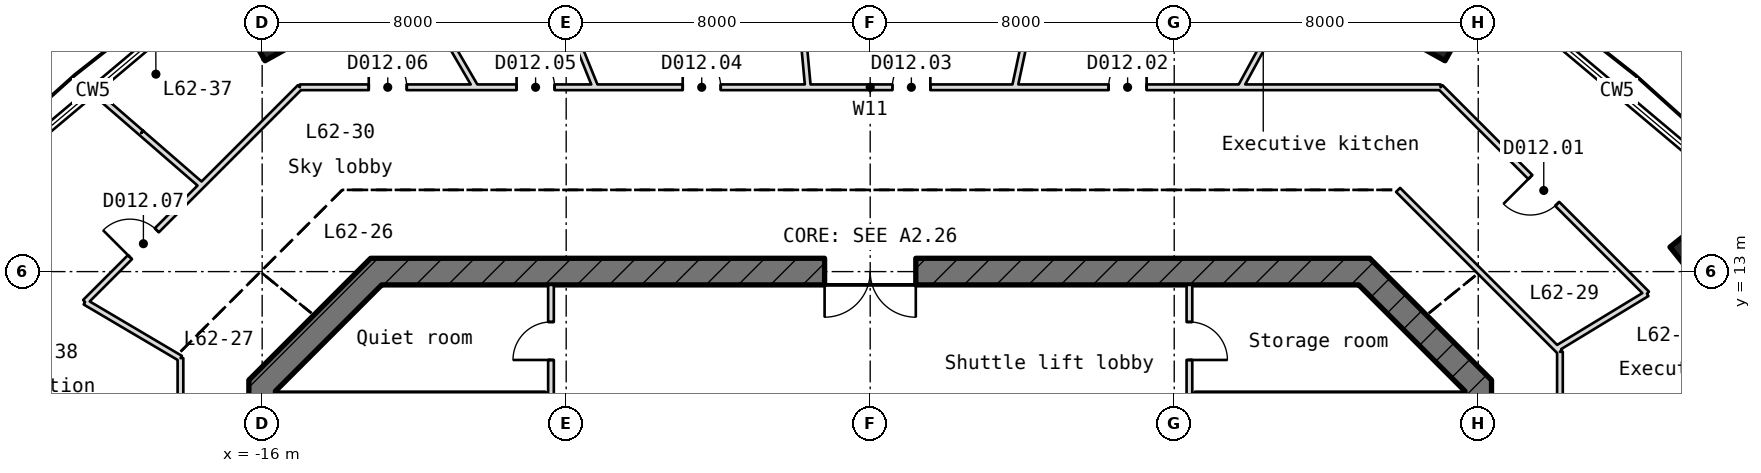
"""IFC4 building model, lengths in metres.
Left out: names, types, materials, properties, quantities, classifications, styles, units other than length and angle.
Written with IfcOpenShell. Run it as: python <this file> out.ifc"""

import sys

from ifc_helpers import new_model, si_unit, direction, frame, frame_2d, origin, origin_2d, place, context, subcontext, project, spatial, rectangle, hollow_rectangle, extrude, element, fill, save


model = new_model("IFC4")
c1 = context("Model", 3, precision=1e-05, world=origin(), true_north=direction((0.0, 1.0)))
c2 = subcontext(c1, "Body", "Model", "MODEL_VIEW")
j1 = project(units=[si_unit("LENGTHUNIT", "METRE"), si_unit("PLANEANGLEUNIT", "RADIAN")], contexts=[c1])
p1 = place(None, origin())
s1 = spatial("IfcSite", under=j1, at=p1, CompositionType="ELEMENT")
p2 = place(p1, origin())
s2 = spatial("IfcBuilding", under=s1, at=p2, CompositionType="ELEMENT")
p3 = place(p2, frame((0.0, 0.0, 279.1)))
s3 = spatial("IfcBuildingStorey", under=s2, at=p3, CompositionType="ELEMENT", Elevation=279.1)
for number, where, z_axis, x_axis in (
    (1, (22.331, 13.524, -0.25), (0.0, 0.0, 1.0), (0.627, -0.779, 0.0)),
    (2, (14.788, 19.793, -0.25), (0.0, 0.0, 1.0), (0.874, -0.486, 0.0)),
    (3, (-15.588, 19.793, -0.25), (0.0, 0.0, 1.0), (0.874, 0.486, 0.0)),
):
    element("IfcColumn", number, at=place(p3, frame(where, z_axis=z_axis, x_axis=x_axis)), inside=s3, PredefinedType="COLUMN", context=c2, shape_type="SweptSolid", body=[
        extrude(hollow_rectangle(XDim=1.8, YDim=1.85, WallThickness=0.06, at=origin_2d()), origin(), (0.0, 0.0, 1.0), 5.47),
    ])
p4 = place(p3, frame((16.0, -10.145, -0.25), z_axis=(0.0, 0.0, 1.0), x_axis=(0.0, 1.0, 0.0)))
e4 = element("IfcWall", 4, at=p4, inside=s3, PredefinedType="SHEAR", context=c2, shape_type="SweptSolid", body=[
    extrude(rectangle(XDim=20.29, YDim=0.7, at=frame_2d((10.145, 0.0))), origin(), (0.0, 0.0, 1.0), 5.47),
])
p5 = place(p4, frame((8.945, 0.0, 0.25)))
e5 = element("IfcOpeningElement", 5, at=p5, cuts=e4, PredefinedType="OPENING", context=c2, shape_type="SweptSolid", body=[
    extrude(rectangle(XDim=2.4, YDim=2.1, at=frame_2d((1.2, 1.05))), frame((0.0, 0.36, 0.0), z_axis=(0.0, -1.0, 0.0), x_axis=(1.0, 0.0, 0.0)), (0.0, 0.0, 1.0), 0.72),
])
p6 = place(p4, frame((13.545, 0.0, 0.25)))
e6 = element("IfcOpeningElement", 6, at=p6, cuts=e4, PredefinedType="OPENING", context=c2, shape_type="SweptSolid", body=[
    extrude(rectangle(XDim=1.2, YDim=2.1, at=frame_2d((0.6, 1.05))), frame((0.0, 0.36, 0.0), z_axis=(0.0, -1.0, 0.0), x_axis=(1.0, 0.0, 0.0)), (0.0, 0.0, 1.0), 0.72),
])
p7 = place(p4, frame((4.745, 0.0, 0.25)))
e7 = element("IfcOpeningElement", 7, at=p7, cuts=e4, PredefinedType="OPENING", context=c2, shape_type="SweptSolid", body=[
    extrude(rectangle(XDim=1.2, YDim=2.1, at=frame_2d((0.6, 1.05))), frame((0.0, 0.36, 0.0), z_axis=(0.0, -1.0, 0.0), x_axis=(1.0, 0.0, 0.0)), (0.0, 0.0, 1.0), 0.72),
])
p8 = place(p3, frame((16.103, 9.897, -0.25), z_axis=(0.0, 0.0, 1.0), x_axis=(-0.707106781187, 0.707106781187, 0.0)))
e8 = element("IfcWall", 8, at=p8, inside=s3, PredefinedType="SHEAR", context=c2, shape_type="SweptSolid", body=[
    extrude(rectangle(XDim=4.533, YDim=0.7, at=frame_2d((2.266, 0.0))), origin(), (0.0, 0.0, 1.0), 5.47),
])
p9 = place(p3, frame((13.145, 13.0, -0.25), z_axis=(0.0, 0.0, 1.0), x_axis=(-1.0, 0.0, 0.0)))
e9 = element("IfcWall", 9, at=p9, inside=s3, PredefinedType="SHEAR", context=c2, shape_type="SweptSolid", body=[
    extrude(rectangle(XDim=26.29, YDim=0.7, at=frame_2d((13.145, 0.0))), origin(), (0.0, 0.0, 1.0), 5.47),
])
p10 = place(p9, frame((11.945, 0.0, 0.25)))
e10 = element("IfcOpeningElement", 10, at=p10, cuts=e9, PredefinedType="OPENING", context=c2, shape_type="SweptSolid", body=[
    extrude(rectangle(XDim=2.4, YDim=2.1, at=frame_2d((1.2, 1.05))), frame((0.0, 0.36, 0.0), z_axis=(0.0, -1.0, 0.0), x_axis=(1.0, 0.0, 0.0)), (0.0, 0.0, 1.0), 0.72),
])
p11 = place(p3, frame((-12.897, 13.103, -0.25), z_axis=(0.0, 0.0, 1.0), x_axis=(-0.707106781187, -0.707106781187, 0.0)))
e11 = element("IfcWall", 11, at=p11, inside=s3, PredefinedType="SHEAR", context=c2, shape_type="SweptSolid", body=[
    extrude(rectangle(XDim=4.533, YDim=0.7, at=frame_2d((2.266, 0.0))), origin(), (0.0, 0.0, 1.0), 5.47),
])
p12 = place(p3, frame((-16.0, 10.145, -0.25), z_axis=(0.0, 0.0, 1.0), x_axis=(0.0, -1.0, 0.0)))
e12 = element("IfcWall", 12, at=p12, inside=s3, PredefinedType="SHEAR", context=c2, shape_type="SweptSolid", body=[
    extrude(rectangle(XDim=20.29, YDim=0.7, at=frame_2d((10.145, 0.0))), origin(), (0.0, 0.0, 1.0), 5.47),
])
p13 = place(p12, frame((8.945, 0.0, 0.25)))
e13 = element("IfcOpeningElement", 13, at=p13, cuts=e12, PredefinedType="OPENING", context=c2, shape_type="SweptSolid", body=[
    extrude(rectangle(XDim=2.4, YDim=2.1, at=frame_2d((1.2, 1.05))), frame((0.0, 0.36, 0.0), z_axis=(0.0, -1.0, 0.0), x_axis=(1.0, 0.0, 0.0)), (0.0, 0.0, 1.0), 0.72),
])
p14 = place(p12, frame((5.545, 0.0, 0.25)))
e14 = element("IfcOpeningElement", 14, at=p14, cuts=e12, PredefinedType="OPENING", context=c2, shape_type="SweptSolid", body=[
    extrude(rectangle(XDim=1.2, YDim=2.1, at=frame_2d((0.6, 1.05))), frame((0.0, 0.36, 0.0), z_axis=(0.0, -1.0, 0.0), x_axis=(1.0, 0.0, 0.0)), (0.0, 0.0, 1.0), 0.72),
])
for number, where, z_axis, x_axis in (
    (15, (-15.65, 9.7, -0.25), (0.0, 0.0, 1.0), (1.0, 0.0, 0.0)),
    (16, (8.55, 9.7, -0.25), (0.0, 0.0, 1.0), (1.0, 0.0, 0.0)),
):
    element("IfcWall", number, at=place(p3, frame(where, z_axis=z_axis, x_axis=x_axis)), inside=s3, PredefinedType="SHEAR", context=c2, shape_type="SweptSolid", body=[
        extrude(rectangle(XDim=7.1, YDim=0.25, at=frame_2d((3.55, 0.0))), origin(), (0.0, 0.0, 1.0), 5.47),
    ])
p15 = place(p3, frame((-8.4, 9.7, 0.0), z_axis=(0.0, 0.0, 1.0), x_axis=(0.0, 1.0, 0.0)))
e17 = element("IfcWall", 17, at=p15, inside=s3, PredefinedType="PARTITIONING", context=c2, shape_type="SweptSolid", body=[
    extrude(rectangle(XDim=2.95, YDim=0.15, at=frame_2d((1.475, 0.0))), origin(), (0.0, 0.0, 1.0), 5.22),
])
p16 = place(p15, frame((0.975, 0.0, 0.0)))
e18 = element("IfcOpeningElement", 18, at=p16, cuts=e17, PredefinedType="OPENING", context=c2, shape_type="SweptSolid", body=[
    extrude(rectangle(XDim=1.0, YDim=2.1, at=frame_2d((0.5, 1.05))), frame((0.0, 0.085, 0.0), z_axis=(0.0, -1.0, 0.0), x_axis=(1.0, 0.0, 0.0)), (0.0, 0.0, 1.0), 0.17),
])
p17 = place(p3, frame((8.4, 9.7, 0.0), z_axis=(0.0, 0.0, 1.0), x_axis=(0.0, 1.0, 0.0)))
e19 = element("IfcWall", 19, at=p17, inside=s3, PredefinedType="PARTITIONING", context=c2, shape_type="SweptSolid", body=[
    extrude(rectangle(XDim=2.95, YDim=0.15, at=frame_2d((1.475, 0.0))), origin(), (0.0, 0.0, 1.0), 5.22),
])
p18 = place(p17, frame((0.975, 0.0, 0.0)))
e20 = element("IfcOpeningElement", 20, at=p18, cuts=e19, PredefinedType="OPENING", context=c2, shape_type="SweptSolid", body=[
    extrude(rectangle(XDim=1.0, YDim=2.1, at=frame_2d((0.5, 1.05))), frame((0.0, 0.085, 0.0), z_axis=(0.0, -1.0, 0.0), x_axis=(1.0, 0.0, 0.0)), (0.0, 0.0, 1.0), 0.17),
])
p19 = place(p3, frame((-15.009, 17.85, 0.0), z_axis=(0.0, 0.0, 1.0), x_axis=(1.0, 0.0, 0.0)))
e21 = element("IfcWall", 21, at=p19, inside=s3, PredefinedType="PARTITIONING", context=c2, shape_type="SweptSolid", body=[
    extrude(rectangle(XDim=30.018, YDim=0.15, at=frame_2d((15.009, 0.0))), origin(), (0.0, 0.0, 1.0), 5.22),
])
p20 = place(p19, frame((21.282, 0.0, 0.0)))
e22 = element("IfcOpeningElement", 22, at=p20, cuts=e21, PredefinedType="OPENING", context=c2, shape_type="SweptSolid", body=[
    extrude(rectangle(XDim=1.0, YDim=2.1, at=frame_2d((0.5, 1.05))), frame((0.0, 0.085, 0.0), z_axis=(0.0, -1.0, 0.0), x_axis=(1.0, 0.0, 0.0)), (0.0, 0.0, 1.0), 0.17),
])
p21 = place(p19, frame((15.592, 0.0, 0.0)))
e23 = element("IfcOpeningElement", 23, at=p21, cuts=e21, PredefinedType="OPENING", context=c2, shape_type="SweptSolid", body=[
    extrude(rectangle(XDim=1.0, YDim=2.1, at=frame_2d((0.5, 1.05))), frame((0.0, 0.085, 0.0), z_axis=(0.0, -1.0, 0.0), x_axis=(1.0, 0.0, 0.0)), (0.0, 0.0, 1.0), 0.17),
])
p22 = place(p19, frame((10.075, 0.0, 0.0)))
e24 = element("IfcOpeningElement", 24, at=p22, cuts=e21, PredefinedType="OPENING", context=c2, shape_type="SweptSolid", body=[
    extrude(rectangle(XDim=1.0, YDim=2.1, at=frame_2d((0.5, 1.05))), frame((0.0, 0.085, 0.0), z_axis=(0.0, -1.0, 0.0), x_axis=(1.0, 0.0, 0.0)), (0.0, 0.0, 1.0), 0.17),
])
p23 = place(p19, frame((5.704, 0.0, 0.0)))
e25 = element("IfcOpeningElement", 25, at=p23, cuts=e21, PredefinedType="OPENING", context=c2, shape_type="SweptSolid", body=[
    extrude(rectangle(XDim=1.0, YDim=2.1, at=frame_2d((0.5, 1.05))), frame((0.0, 0.085, 0.0), z_axis=(0.0, -1.0, 0.0), x_axis=(1.0, 0.0, 0.0)), (0.0, 0.0, 1.0), 0.17),
])
p24 = place(p19, frame((1.814, 0.0, 0.0)))
e26 = element("IfcOpeningElement", 26, at=p24, cuts=e21, PredefinedType="OPENING", context=c2, shape_type="SweptSolid", body=[
    extrude(rectangle(XDim=1.0, YDim=2.1, at=frame_2d((0.5, 1.05))), frame((0.0, 0.085, 0.0), z_axis=(0.0, -1.0, 0.0), x_axis=(1.0, 0.0, 0.0)), (0.0, 0.0, 1.0), 0.17),
])
p25 = place(p3, frame((18.15, 7.049, 0.0), z_axis=(0.0, 0.0, 1.0), x_axis=(0.932169041373, 0.362023311828, 0.0)))
e27 = element("IfcWall", 27, at=p25, inside=s3, PredefinedType="PARTITIONING", context=c2, shape_type="SweptSolid", body=[
    extrude(rectangle(XDim=8.19, YDim=0.15, at=frame_2d((4.095, 0.0))), origin(), (0.0, 0.0, 1.0), 5.22),
])
p26 = place(p3, frame((18.064, 10.976, 0.0), z_axis=(0.0, 0.0, 1.0), x_axis=(0.854588442766, 0.519305876619, 0.0)))
e28 = element("IfcWall", 28, at=p26, inside=s3, PredefinedType="PARTITIONING", context=c2, shape_type="SweptSolid", body=[
    extrude(rectangle(XDim=2.779, YDim=0.15, at=frame_2d((1.39, 0.0))), origin(), (0.0, 0.0, 1.0), 4.867),
])
p27 = place(p3, frame((-20.659, 12.2, 0.0), z_axis=(0.0, 0.0, 1.0), x_axis=(0.707091504448, 0.707122057596, 0.0)))
e29 = element("IfcWall", 29, at=p27, inside=s3, PredefinedType="PARTITIONING", context=c2, shape_type="SweptSolid", body=[
    extrude(rectangle(XDim=7.991, YDim=0.15, at=frame_2d((3.995, 0.0))), origin(), (0.0, 0.0, 1.0), 5.22),
])
p28 = place(p27, frame((1.67, 0.0, 0.0)))
e30 = element("IfcOpeningElement", 30, at=p28, cuts=e29, PredefinedType="OPENING", context=c2, shape_type="SweptSolid", body=[
    extrude(rectangle(XDim=1.0, YDim=2.1, at=frame_2d((0.5, 1.05))), frame((0.0, 0.085, 0.0), z_axis=(0.0, -1.0, 0.0), x_axis=(1.0, 0.0, 0.0)), (0.0, 0.0, 1.0), 0.17),
])
p29 = place(p3, frame((9.742, 17.85, 0.0), z_axis=(0.0, 0.0, 1.0), x_axis=(0.479051311854, 0.877786899316, 0.0)))
e31 = element("IfcWall", 31, at=p29, inside=s3, PredefinedType="PARTITIONING", context=c2, shape_type="SweptSolid", body=[
    extrude(rectangle(XDim=3.435, YDim=0.15, at=frame_2d((1.717, 0.0))), origin(), (0.0, 0.0, 1.0), 4.803),
])
p30 = place(p3, frame((3.804, 17.85, 0.0), z_axis=(0.0, 0.0, 1.0), x_axis=(0.208471298824, 0.978028485049, 0.0)))
e32 = element("IfcWall", 32, at=p30, inside=s3, PredefinedType="PARTITIONING", context=c2, shape_type="SweptSolid", body=[
    extrude(rectangle(XDim=5.029, YDim=0.15, at=frame_2d((2.514, 0.0))), origin(), (0.0, 0.0, 1.0), 4.684),
])
p31 = place(p3, frame((18.15, -10.891, 0.0), z_axis=(0.0, 0.0, 1.0), x_axis=(0.0, 1.0, 0.0)))
e33 = element("IfcWall", 33, at=p31, inside=s3, PredefinedType="PARTITIONING", context=c2, shape_type="SweptSolid", body=[
    extrude(rectangle(XDim=21.781, YDim=0.15, at=frame_2d((10.891, 0.0))), origin(), (0.0, 0.0, 1.0), 5.22),
])
p32 = place(p31, frame((2.054, 0.0, 0.0)))
e34 = element("IfcOpeningElement", 34, at=p32, cuts=e33, PredefinedType="OPENING", context=c2, shape_type="SweptSolid", body=[
    extrude(rectangle(XDim=1.0, YDim=2.1, at=frame_2d((0.5, 1.05))), frame((0.0, 0.085, 0.0), z_axis=(0.0, -1.0, 0.0), x_axis=(1.0, 0.0, 0.0)), (0.0, 0.0, 1.0), 0.17),
])
p33 = place(p31, frame((7.791, 0.0, 0.0)))
e35 = element("IfcOpeningElement", 35, at=p33, cuts=e33, PredefinedType="OPENING", context=c2, shape_type="SweptSolid", body=[
    extrude(rectangle(XDim=1.0, YDim=2.1, at=frame_2d((0.5, 1.05))), frame((0.0, 0.085, 0.0), z_axis=(0.0, -1.0, 0.0), x_axis=(1.0, 0.0, 0.0)), (0.0, 0.0, 1.0), 0.17),
])
p34 = place(p31, frame((14.207, 0.0, 0.0)))
e36 = element("IfcOpeningElement", 36, at=p34, cuts=e33, PredefinedType="OPENING", context=c2, shape_type="SweptSolid", body=[
    extrude(rectangle(XDim=1.0, YDim=2.1, at=frame_2d((0.5, 1.05))), frame((0.0, 0.085, 0.0), z_axis=(0.0, -1.0, 0.0), x_axis=(1.0, 0.0, 0.0)), (0.0, 0.0, 1.0), 0.17),
])
p35 = place(p3, frame((-18.15, -10.891, 0.0), z_axis=(0.0, 0.0, 1.0), x_axis=(0.0, 1.0, 0.0)))
e37 = element("IfcWall", 37, at=p35, inside=s3, PredefinedType="PARTITIONING", context=c2, shape_type="SweptSolid", body=[
    extrude(rectangle(XDim=21.614, YDim=0.15, at=frame_2d((10.807, 0.0))), origin(), (0.0, 0.0, 1.0), 5.22),
])
p36 = place(p35, frame((14.093, 0.0, 0.0)))
e38 = element("IfcOpeningElement", 38, at=p36, cuts=e37, PredefinedType="OPENING", context=c2, shape_type="SweptSolid", body=[
    extrude(rectangle(XDim=1.0, YDim=2.1, at=frame_2d((0.5, 1.05))), frame((0.0, 0.085, 0.0), z_axis=(0.0, -1.0, 0.0), x_axis=(1.0, 0.0, 0.0)), (0.0, 0.0, 1.0), 0.17),
])
p37 = place(p35, frame((7.87, 0.0, 0.0)))
e39 = element("IfcOpeningElement", 39, at=p37, cuts=e37, PredefinedType="OPENING", context=c2, shape_type="SweptSolid", body=[
    extrude(rectangle(XDim=1.0, YDim=2.1, at=frame_2d((0.5, 1.05))), frame((0.0, 0.085, 0.0), z_axis=(0.0, -1.0, 0.0), x_axis=(1.0, 0.0, 0.0)), (0.0, 0.0, 1.0), 0.17),
])
p38 = place(p35, frame((2.92, 0.0, 0.0)))
e40 = element("IfcOpeningElement", 40, at=p38, cuts=e37, PredefinedType="OPENING", context=c2, shape_type="SweptSolid", body=[
    extrude(rectangle(XDim=1.0, YDim=2.1, at=frame_2d((0.5, 1.05))), frame((0.0, 0.085, 0.0), z_axis=(0.0, -1.0, 0.0), x_axis=(1.0, 0.0, 0.0)), (0.0, 0.0, 1.0), 0.17),
])
p39 = place(p3, frame((-1.638, 17.85, 0.0), z_axis=(0.0, 0.0, 1.0), x_axis=(-0.091426453393, 0.995811831432, 0.0)))
e41 = element("IfcWall", 41, at=p39, inside=s3, PredefinedType="PARTITIONING", context=c2, shape_type="SweptSolid", body=[
    extrude(rectangle(XDim=6.895, YDim=0.15, at=frame_2d((3.447, 0.0))), origin(), (0.0, 0.0, 1.0), 5.22),
])
p40 = place(p3, frame((-7.229, 17.85, 0.0), z_axis=(0.0, 0.0, 1.0), x_axis=(-0.375357230071, 0.926880224103, 0.0)))
e42 = element("IfcWall", 42, at=p40, inside=s3, PredefinedType="PARTITIONING", context=c2, shape_type="SweptSolid", body=[
    extrude(rectangle(XDim=4.464, YDim=0.15, at=frame_2d((2.232, 0.0))), origin(), (0.0, 0.0, 1.0), 4.753),
])
p41 = place(p3, frame((-10.382, 17.85, 0.0), z_axis=(0.0, 0.0, 1.0), x_axis=(-0.502765445724, 0.864422874863, 0.0)))
e43 = element("IfcWall", 43, at=p41, inside=s3, PredefinedType="PARTITIONING", context=c2, shape_type="SweptSolid", body=[
    extrude(rectangle(XDim=5.151, YDim=0.15, at=frame_2d((2.575, 0.0))), origin(), (0.0, 0.0, 1.0), 5.22),
])
p42 = place(p3, frame((20.439, 12.42, 0.0), z_axis=(0.0, 0.0, 1.0), x_axis=(-0.707106781187, 0.707106781187, 0.0)))
e44 = element("IfcWall", 44, at=p42, inside=s3, PredefinedType="PARTITIONING", context=c2, shape_type="SweptSolid", body=[
    extrude(rectangle(XDim=7.68, YDim=0.15, at=frame_2d((3.84, 0.0))), origin(), (0.0, 0.0, 1.0), 5.22),
])
p43 = place(p42, frame((3.34, 0.0, 0.0)))
e45 = element("IfcOpeningElement", 45, at=p43, cuts=e44, PredefinedType="OPENING", context=c2, shape_type="SweptSolid", body=[
    extrude(rectangle(XDim=1.0, YDim=2.1, at=frame_2d((0.5, 1.05))), frame((0.0, 0.085, 0.0), z_axis=(0.0, -1.0, 0.0), x_axis=(1.0, 0.0, 0.0)), (0.0, 0.0, 1.0), 0.17),
])
p44 = place(p3, frame((18.15, 10.891, 0.0), z_axis=(0.0, 0.0, 1.0), x_axis=(-0.707106781187, 0.707106781187, 0.0)))
e46 = element("IfcWall", 46, at=p44, inside=s3, PredefinedType="PARTITIONING", context=c2, shape_type="SweptSolid", body=[
    extrude(rectangle(XDim=6.023, YDim=0.15, at=frame_2d((3.012, 0.0))), origin(), (0.0, 0.0, 1.0), 5.22),
])
p45 = place(p3, frame((-17.591, 15.268, 0.0), z_axis=(0.0, 0.0, 1.0), x_axis=(-0.755191662586, 0.655504044808, 0.0)))
e47 = element("IfcWall", 47, at=p45, inside=s3, PredefinedType="PARTITIONING", context=c2, shape_type="SweptSolid", body=[
    extrude(rectangle(XDim=2.106, YDim=0.15, at=frame_2d((1.053, 0.0))), origin(), (0.0, 0.0, 1.0), 4.91),
])
p46 = place(p3, frame((-19.181, 16.649, 0.0), z_axis=(0.0, 0.0, 1.0), x_axis=(-0.755229676687, 0.655460247041, 0.0)))
e48 = element("IfcWall", 48, at=p46, inside=s3, PredefinedType="PARTITIONING", context=c2, shape_type="SweptSolid", body=[
    extrude(rectangle(XDim=1.667, YDim=0.15, at=frame_2d((0.833, 0.0))), origin(), (0.0, 0.0, 1.0), 5.22),
])
p47 = place(p3, frame((-18.15, 10.718, 0.0), z_axis=(0.0, 0.0, 1.0), x_axis=(-0.861086603375, 0.508458318339, 0.0)))
e49 = element("IfcWall", 49, at=p47, inside=s3, PredefinedType="PARTITIONING", context=c2, shape_type="SweptSolid", body=[
    extrude(rectangle(XDim=2.914, YDim=0.15, at=frame_2d((1.457, 0.0))), origin(), (0.0, 0.0, 1.0), 5.22),
])
p48 = place(p3, frame((-18.15, 6.837, 0.0), z_axis=(0.0, 0.0, 1.0), x_axis=(-0.935798247138, 0.352536013271, 0.0)))
e50 = element("IfcWall", 50, at=p48, inside=s3, PredefinedType="PARTITIONING", context=c2, shape_type="SweptSolid", body=[
    extrude(rectangle(XDim=9.013, YDim=0.15, at=frame_2d((4.507, 0.0))), origin(), (0.0, 0.0, 1.0), 5.22),
])
p49 = place(p10, origin())
e51 = element("IfcDoor", 51, at=p49, inside=s3, OperationType="DOUBLE_DOOR_SINGLE_SWING", PredefinedType="DOOR", context=c2, shape_type="SweptSolid", body=[
    extrude(rectangle(XDim=2.4, YDim=2.1, at=frame_2d((1.2, 1.05))), frame((0.0, 0.025, 0.0), z_axis=(0.0, -1.0, 0.0), x_axis=(1.0, 0.0, 0.0)), (0.0, 0.0, 1.0), 0.05),
])
fill(e10, e51)
p50 = place(p16, origin())
e52 = element("IfcDoor", 52, at=p50, inside=s3, OperationType="SINGLE_SWING_RIGHT", PredefinedType="DOOR", context=c2, shape_type="SweptSolid", body=[
    extrude(rectangle(XDim=1.0, YDim=2.1, at=frame_2d((0.5, 1.05))), frame((0.0, 0.025, 0.0), z_axis=(0.0, -1.0, 0.0), x_axis=(1.0, 0.0, 0.0)), (0.0, 0.0, 1.0), 0.05),
])
fill(e18, e52)
p51 = place(p18, frame((1.0, 0.0, 0.0), z_axis=(0.0, 0.0, 1.0), x_axis=(-1.0, 0.0, 0.0)))
e53 = element("IfcDoor", 53, at=p51, inside=s3, OperationType="SINGLE_SWING_LEFT", PredefinedType="DOOR", context=c2, shape_type="SweptSolid", body=[
    extrude(rectangle(XDim=1.0, YDim=2.1, at=frame_2d((0.5, 1.05))), frame((0.0, 0.025, 0.0), z_axis=(0.0, -1.0, 0.0), x_axis=(1.0, 0.0, 0.0)), (0.0, 0.0, 1.0), 0.05),
])
fill(e20, e53)
p52 = place(p43, origin())
e54 = element("IfcDoor", 54, at=p52, inside=s3, OperationType="SINGLE_SWING_RIGHT", PredefinedType="DOOR", context=c2, shape_type="SweptSolid", body=[
    extrude(rectangle(XDim=1.0, YDim=2.1, at=frame_2d((0.5, 1.05))), frame((0.0, 0.025, 0.0), z_axis=(0.0, -1.0, 0.0), x_axis=(1.0, 0.0, 0.0)), (0.0, 0.0, 1.0), 0.05),
])
fill(e45, e54)
p53 = place(p20, origin())
e55 = element("IfcDoor", 55, at=p53, inside=s3, OperationType="SINGLE_SWING_RIGHT", PredefinedType="DOOR", context=c2, shape_type="SweptSolid", body=[
    extrude(rectangle(XDim=1.0, YDim=2.1, at=frame_2d((0.5, 1.05))), frame((0.0, 0.025, 0.0), z_axis=(0.0, -1.0, 0.0), x_axis=(1.0, 0.0, 0.0)), (0.0, 0.0, 1.0), 0.05),
])
fill(e22, e55)
p54 = place(p21, origin())
e56 = element("IfcDoor", 56, at=p54, inside=s3, OperationType="SINGLE_SWING_RIGHT", PredefinedType="DOOR", context=c2, shape_type="SweptSolid", body=[
    extrude(rectangle(XDim=1.0, YDim=2.1, at=frame_2d((0.5, 1.05))), frame((0.0, 0.025, 0.0), z_axis=(0.0, -1.0, 0.0), x_axis=(1.0, 0.0, 0.0)), (0.0, 0.0, 1.0), 0.05),
])
fill(e23, e56)
p55 = place(p22, origin())
e57 = element("IfcDoor", 57, at=p55, inside=s3, OperationType="SINGLE_SWING_RIGHT", PredefinedType="DOOR", context=c2, shape_type="SweptSolid", body=[
    extrude(rectangle(XDim=1.0, YDim=2.1, at=frame_2d((0.5, 1.05))), frame((0.0, 0.025, 0.0), z_axis=(0.0, -1.0, 0.0), x_axis=(1.0, 0.0, 0.0)), (0.0, 0.0, 1.0), 0.05),
])
fill(e24, e57)
p56 = place(p23, origin())
e58 = element("IfcDoor", 58, at=p56, inside=s3, OperationType="SINGLE_SWING_RIGHT", PredefinedType="DOOR", context=c2, shape_type="SweptSolid", body=[
    extrude(rectangle(XDim=1.0, YDim=2.1, at=frame_2d((0.5, 1.05))), frame((0.0, 0.025, 0.0), z_axis=(0.0, -1.0, 0.0), x_axis=(1.0, 0.0, 0.0)), (0.0, 0.0, 1.0), 0.05),
])
fill(e25, e58)
p57 = place(p24, origin())
e59 = element("IfcDoor", 59, at=p57, inside=s3, OperationType="SINGLE_SWING_RIGHT", PredefinedType="DOOR", context=c2, shape_type="SweptSolid", body=[
    extrude(rectangle(XDim=1.0, YDim=2.1, at=frame_2d((0.5, 1.05))), frame((0.0, 0.025, 0.0), z_axis=(0.0, -1.0, 0.0), x_axis=(1.0, 0.0, 0.0)), (0.0, 0.0, 1.0), 0.05),
])
fill(e26, e59)
p58 = place(p28, origin())
e60 = element("IfcDoor", 60, at=p58, inside=s3, OperationType="SINGLE_SWING_RIGHT", PredefinedType="DOOR", context=c2, shape_type="SweptSolid", body=[
    extrude(rectangle(XDim=1.0, YDim=2.1, at=frame_2d((0.5, 1.05))), frame((0.0, 0.025, 0.0), z_axis=(0.0, -1.0, 0.0), x_axis=(1.0, 0.0, 0.0)), (0.0, 0.0, 1.0), 0.05),
])
fill(e30, e60)
save(model, sys.argv[1])
